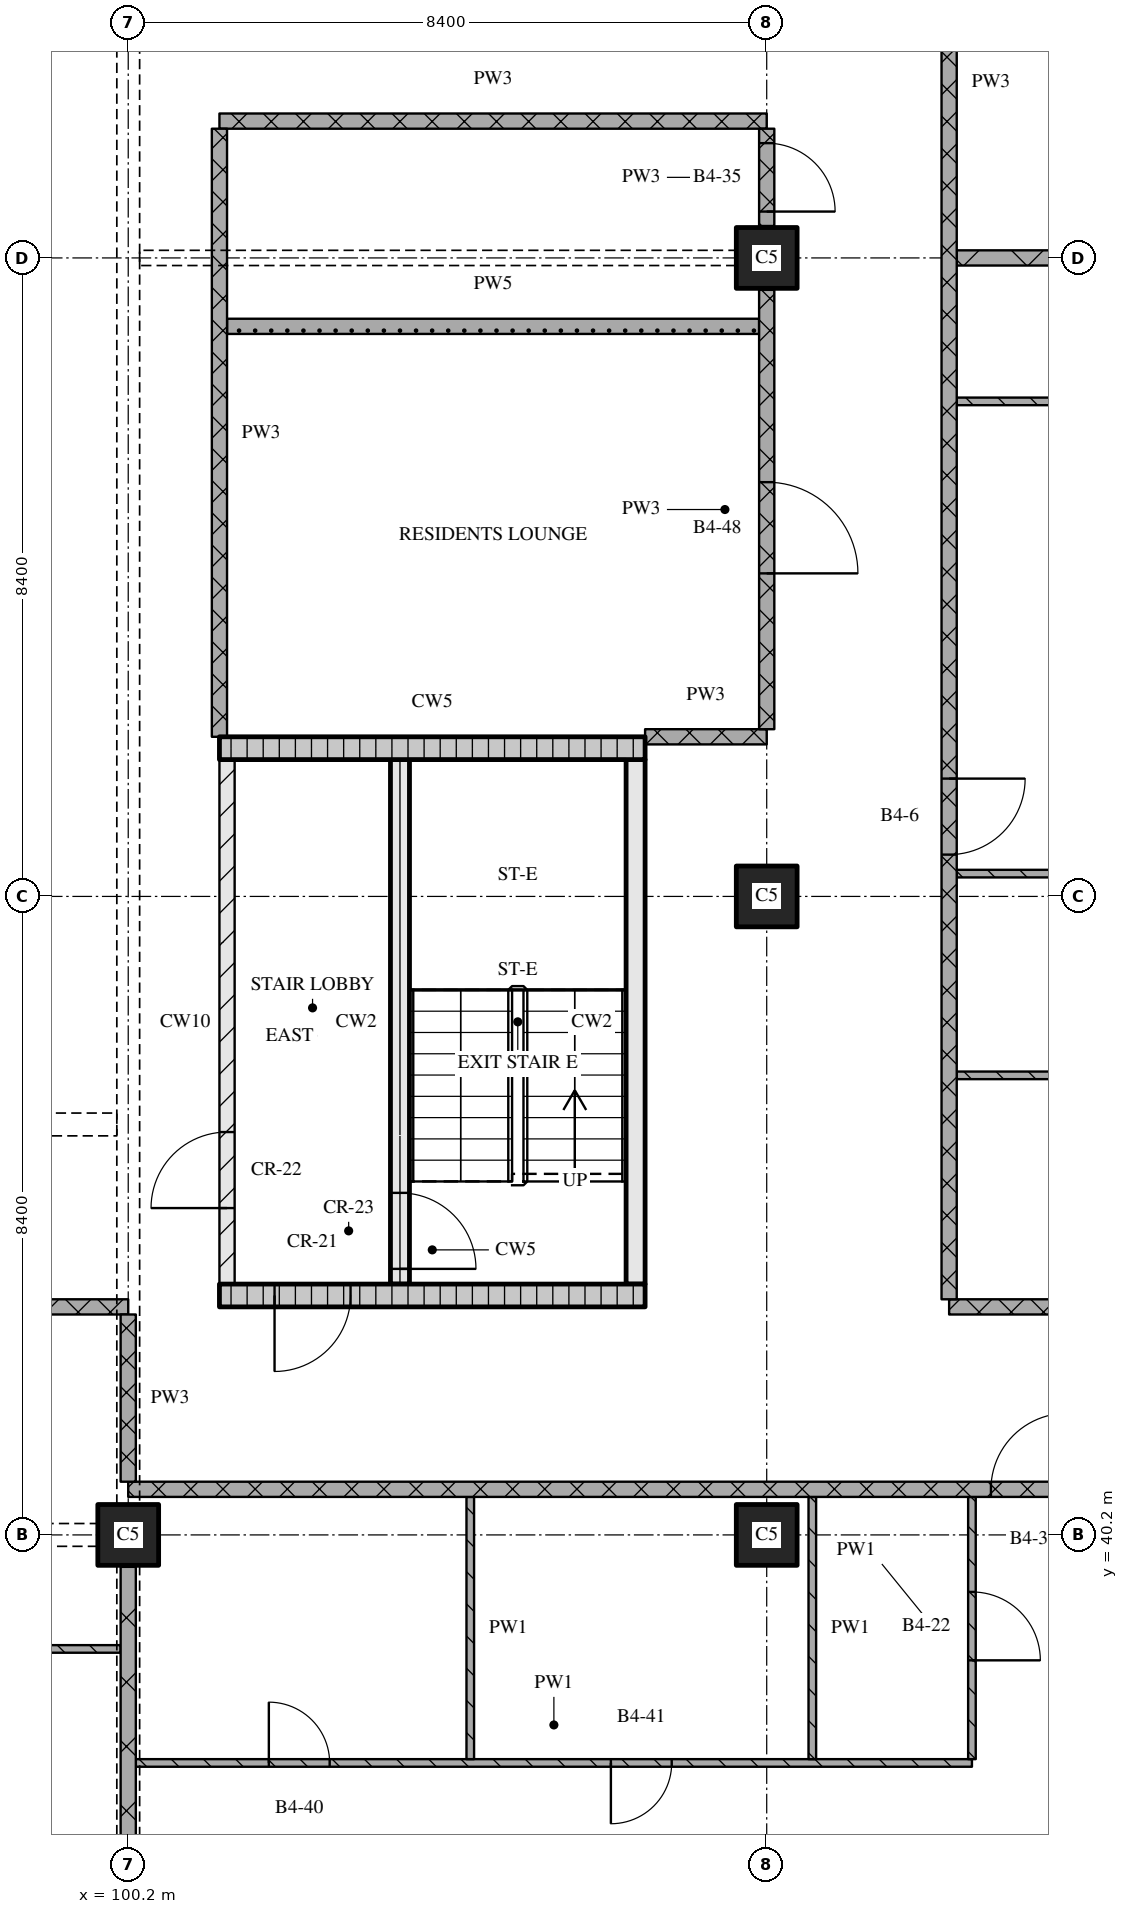
"""IFC4 building model, lengths in metres.
Left out: names, types, materials, properties, quantities, classifications, styles, units other than length and angle.
Written with IfcOpenShell. Run it as: python <this file> out.ifc"""

import sys

from ifc_helpers import new_model, si_unit, direction, frame, frame_2d, origin, origin_2d, place, context, subcontext, project, spatial, rectangle, extrude, element, fill, save


model = new_model("IFC4")
c1 = context("Model", 3, precision=1e-05, world=origin(), true_north=direction((0.0, 1.0)))
c2 = subcontext(c1, "Body", "Model", "MODEL_VIEW")
j1 = project(units=[si_unit("LENGTHUNIT", "METRE"), si_unit("PLANEANGLEUNIT", "RADIAN")], contexts=[c1])
p1 = place(None, origin())
s1 = spatial("IfcSite", under=j1, at=p1, CompositionType="ELEMENT")
p2 = place(p1, origin())
s2 = spatial("IfcBuilding", under=s1, at=p2, CompositionType="ELEMENT")
p3 = place(p2, frame((0.0, 0.0, 134.85)))
s3 = spatial("IfcBuildingStorey", under=s2, at=p3, CompositionType="ELEMENT", Elevation=134.85)
for number, where, z_axis, x_axis in (
    (1, (100.2, 40.2, 0.0), (0.0, 0.0, 1.0), (1.0, 0.0, 0.0)),
    (2, (108.6, 40.2, 0.0), (0.0, 0.0, 1.0), (1.0, 0.0, 0.0)),
    (3, (108.6, 48.6, 0.0), (0.0, 0.0, 1.0), (1.0, 0.0, 0.0)),
    (4, (108.6, 57.0, 0.0), (0.0, 0.0, 1.0), (1.0, 0.0, 0.0)),
):
    element("IfcColumn", number, at=place(p3, frame(where, z_axis=z_axis, x_axis=x_axis)), inside=s3, PredefinedType="COLUMN", context=c2, shape_type="SweptSolid", body=[
        extrude(rectangle(XDim=0.8, YDim=0.8, at=origin_2d()), origin(), (0.0, 0.0, 1.0), 3.6),
    ])
p4 = place(p3, frame((101.4, 43.35, 0.0), z_axis=(0.0, 0.0, 1.0), x_axis=(1.0, 0.0, 0.0)))
e5 = element("IfcWall", 5, at=p4, inside=s3, PredefinedType="SOLIDWALL", context=c2, shape_type="SweptSolid", body=[
    extrude(rectangle(XDim=5.6, YDim=0.3, at=frame_2d((2.8, 0.0))), origin(), (0.0, 0.0, 1.0), 3.32),
])
p5 = place(p4, frame((0.725, 0.0, 0.0)))
e6 = element("IfcOpeningElement", 6, at=p5, cuts=e5, PredefinedType="OPENING", context=c2, shape_type="SweptSolid", body=[
    extrude(rectangle(XDim=1.0, YDim=2.1, at=frame_2d((0.5, 1.05))), frame((0.0, 0.16, 0.0), z_axis=(0.0, -1.0, 0.0), x_axis=(1.0, 0.0, 0.0)), (0.0, 0.0, 1.0), 0.32),
])
p6 = place(p3, frame((101.5, 43.5, 0.0), z_axis=(0.0, 0.0, 1.0), x_axis=(0.0, 1.0, 0.0)))
e7 = element("IfcWall", 7, at=p6, inside=s3, PredefinedType="PARTITIONING", context=c2, shape_type="SweptSolid", body=[
    extrude(rectangle(XDim=6.9, YDim=0.2, at=frame_2d((3.45, 0.0))), origin(), (0.0, 0.0, 1.0), 3.32),
])
p7 = place(p6, frame((1.0, 0.0, 0.0)))
e8 = element("IfcOpeningElement", 8, at=p7, cuts=e7, PredefinedType="OPENING", context=c2, shape_type="SweptSolid", body=[
    extrude(rectangle(XDim=1.0, YDim=2.1, at=frame_2d((0.5, 1.05))), frame((0.0, 0.11, 0.0), z_axis=(0.0, -1.0, 0.0), x_axis=(1.0, 0.0, 0.0)), (0.0, 0.0, 1.0), 0.22),
])
p8 = place(p3, frame((103.775, 43.5, 0.0), z_axis=(0.0, 0.0, 1.0), x_axis=(0.0, 1.0, 0.0)))
e9 = element("IfcWall", 9, at=p8, inside=s3, PredefinedType="SOLIDWALL", context=c2, shape_type="SweptSolid", body=[
    extrude(rectangle(XDim=6.9, YDim=0.25, at=frame_2d((3.45, 0.0))), origin(), (0.0, 0.0, 1.0), 3.32),
])
p9 = place(p8, frame((0.2, 0.0, 0.0)))
e10 = element("IfcOpeningElement", 10, at=p9, cuts=e9, PredefinedType="OPENING", context=c2, shape_type="SweptSolid", body=[
    extrude(rectangle(XDim=1.0, YDim=2.1, at=frame_2d((0.5, 1.05))), frame((0.0, 0.135, 0.0), z_axis=(0.0, -1.0, 0.0), x_axis=(1.0, 0.0, 0.0)), (0.0, 0.0, 1.0), 0.27),
])
p10 = place(p3, frame((106.875, 43.5, 0.0), z_axis=(0.0, 0.0, 1.0), x_axis=(0.0, 1.0, 0.0)))
e11 = element("IfcWall", 11, at=p10, inside=s3, PredefinedType="SOLIDWALL", context=c2, shape_type="SweptSolid", body=[
    extrude(rectangle(XDim=6.9, YDim=0.25, at=frame_2d((3.45, 0.0))), origin(), (0.0, 0.0, 1.0), 3.32),
])
p11 = place(p3, frame((101.4, 50.55, 0.0), z_axis=(0.0, 0.0, 1.0), x_axis=(1.0, 0.0, 0.0)))
e12 = element("IfcWall", 12, at=p11, inside=s3, PredefinedType="SOLIDWALL", context=c2, shape_type="SweptSolid", body=[
    extrude(rectangle(XDim=5.6, YDim=0.3, at=frame_2d((2.8, 0.0))), origin(), (0.0, 0.0, 1.0), 3.32),
])
p12 = place(p3, frame((100.3, 37.2, 0.0), z_axis=(0.0, 0.0, 1.0), x_axis=(1.0, 0.0, 0.0)))
e13 = element("IfcWall", 13, at=p12, inside=s3, PredefinedType="PARTITIONING", context=c2, shape_type="SweptSolid", body=[
    extrude(rectangle(XDim=11.0, YDim=0.1, at=frame_2d((5.5, 0.0))), origin(), (0.0, 0.0, 1.0), 3.32),
])
p13 = place(p12, frame((1.75, 0.0, 0.0)))
e14 = element("IfcOpeningElement", 14, at=p13, cuts=e13, PredefinedType="OPENING", context=c2, shape_type="SweptSolid", body=[
    extrude(rectangle(XDim=0.8, YDim=2.1, at=frame_2d((0.4, 1.05))), frame((0.0, 0.06, 0.0), z_axis=(0.0, -1.0, 0.0), x_axis=(1.0, 0.0, 0.0)), (0.0, 0.0, 1.0), 0.12),
])
p14 = place(p12, frame((6.25, 0.0, 0.0)))
e15 = element("IfcOpeningElement", 15, at=p14, cuts=e13, PredefinedType="OPENING", context=c2, shape_type="SweptSolid", body=[
    extrude(rectangle(XDim=0.8, YDim=2.1, at=frame_2d((0.4, 1.05))), frame((0.0, 0.06, 0.0), z_axis=(0.0, -1.0, 0.0), x_axis=(1.0, 0.0, 0.0)), (0.0, 0.0, 1.0), 0.12),
])
p15 = place(p3, frame((91.2, 38.7, 0.0), z_axis=(0.0, 0.0, 1.0), x_axis=(1.0, 0.0, 0.0)))
e16 = element("IfcWall", 16, at=p15, inside=s3, PredefinedType="PARTITIONING", context=c2, shape_type="SweptSolid", body=[
    extrude(rectangle(XDim=8.9, YDim=0.1, at=frame_2d((4.45, 0.0))), origin(), (0.0, 0.0, 1.0), 3.32),
])
p16 = place(p15, frame((4.05, 0.0, 0.0)))
e17 = element("IfcOpeningElement", 17, at=p16, cuts=e16, PredefinedType="OPENING", context=c2, shape_type="SweptSolid", body=[
    extrude(rectangle(XDim=0.9, YDim=2.1, at=frame_2d((0.45, 1.05))), frame((0.0, 0.06, 0.0), z_axis=(0.0, -1.0, 0.0), x_axis=(1.0, 0.0, 0.0)), (0.0, 0.0, 1.0), 0.12),
])
p17 = place(p3, frame((124.38, 40.8, 0.0), z_axis=(0.0, 0.0, 1.0), x_axis=(-1.0, 0.0, 0.0)))
e18 = element("IfcWall", 18, at=p17, inside=s3, PredefinedType="PARTITIONING", context=c2, shape_type="SweptSolid", body=[
    extrude(rectangle(XDim=24.18, YDim=0.2, at=frame_2d((12.09, 0.0))), origin(), (0.0, 0.0, 1.0), 3.32),
])
p18 = place(p17, frame((11.83, 0.0, 0.0)))
e19 = element("IfcOpeningElement", 19, at=p18, cuts=e18, PredefinedType="OPENING", context=c2, shape_type="SweptSolid", body=[
    extrude(rectangle(XDim=1.0, YDim=2.1, at=frame_2d((0.5, 1.05))), frame((0.0, 0.11, 0.0), z_axis=(0.0, -1.0, 0.0), x_axis=(1.0, 0.0, 0.0)), (0.0, 0.0, 1.0), 0.22),
])
p19 = place(p3, frame((100.2, 43.2, 0.0), z_axis=(0.0, 0.0, 1.0), x_axis=(-1.0, 0.0, 0.0)))
e20 = element("IfcWall", 20, at=p19, inside=s3, PredefinedType="PARTITIONING", context=c2, shape_type="SweptSolid", body=[
    extrude(rectangle(XDim=25.2, YDim=0.2, at=frame_2d((12.6, 0.0))), origin(), (0.0, 0.0, 1.0), 3.32),
])
p20 = place(p19, frame((16.75, 0.0, 0.0)))
e21 = element("IfcOpeningElement", 21, at=p20, cuts=e20, PredefinedType="OPENING", context=c2, shape_type="SweptSolid", body=[
    extrude(rectangle(XDim=1.0, YDim=2.1, at=frame_2d((0.5, 1.05))), frame((0.0, 0.11, 0.0), z_axis=(0.0, -1.0, 0.0), x_axis=(1.0, 0.0, 0.0)), (0.0, 0.0, 1.0), 0.22),
])
p21 = place(p3, frame((111.0, 43.2, 0.0), z_axis=(0.0, 0.0, 1.0), x_axis=(1.0, 0.0, 0.0)))
e22 = element("IfcWall", 22, at=p21, inside=s3, PredefinedType="PARTITIONING", context=c2, shape_type="SweptSolid", body=[
    extrude(rectangle(XDim=15.92, YDim=0.2, at=frame_2d((7.96, 0.0))), origin(), (0.0, 0.0, 1.0), 3.32),
])
p22 = place(p3, frame((111.1, 46.246, 0.0), z_axis=(0.0, 0.0, 1.0), x_axis=(1.0, 0.0, 0.0)))
e23 = element("IfcWall", 23, at=p22, inside=s3, PredefinedType="PARTITIONING", context=c2, shape_type="SweptSolid", body=[
    extrude(rectangle(XDim=8.55, YDim=0.1, at=frame_2d((4.275, 0.0))), origin(), (0.0, 0.0, 1.0), 3.32),
])
p23 = place(p3, frame((111.1, 48.9, 0.0), z_axis=(0.0, 0.0, 1.0), x_axis=(1.0, 0.0, 0.0)))
e24 = element("IfcWall", 24, at=p23, inside=s3, PredefinedType="PARTITIONING", context=c2, shape_type="SweptSolid", body=[
    extrude(rectangle(XDim=5.48, YDim=0.1, at=frame_2d((2.74, 0.0))), origin(), (0.0, 0.0, 1.0), 3.32),
])
p24 = place(p3, frame((107.0, 50.7, 0.0), z_axis=(0.0, 0.0, 1.0), x_axis=(1.0, 0.0, 0.0)))
e25 = element("IfcWall", 25, at=p24, inside=s3, PredefinedType="PARTITIONING", context=c2, shape_type="SweptSolid", body=[
    extrude(rectangle(XDim=1.6, YDim=0.2, at=frame_2d((0.8, 0.0))), origin(), (0.0, 0.0, 1.0), 3.32),
])
p25 = place(p3, frame((111.1, 55.113, 0.0), z_axis=(0.0, 0.0, 1.0), x_axis=(1.0, 0.0, 0.0)))
e26 = element("IfcWall", 26, at=p25, inside=s3, PredefinedType="PARTITIONING", context=c2, shape_type="SweptSolid", body=[
    extrude(rectangle(XDim=8.6, YDim=0.1, at=frame_2d((4.3, 0.0))), origin(), (0.0, 0.0, 1.0), 3.32),
])
p26 = place(p3, frame((101.5, 56.1, 0.0), z_axis=(0.0, 0.0, 1.0), x_axis=(1.0, 0.0, 0.0)))
e27 = element("IfcWall", 27, at=p26, inside=s3, PredefinedType="PARTITIONING", context=c2, shape_type="SweptSolid", body=[
    extrude(rectangle(XDim=7.0, YDim=0.2, at=frame_2d((3.5, 0.0))), origin(), (0.0, 0.0, 1.0), 3.32),
])
p27 = place(p3, frame((111.1, 57.0, 0.0), z_axis=(0.0, 0.0, 1.0), x_axis=(1.0, 0.0, 0.0)))
e28 = element("IfcWall", 28, at=p27, inside=s3, PredefinedType="PARTITIONING", context=c2, shape_type="SweptSolid", body=[
    extrude(rectangle(XDim=5.48, YDim=0.2, at=frame_2d((2.74, 0.0))), origin(), (0.0, 0.0, 1.0), 3.32),
])
p28 = place(p3, frame((101.4, 58.8, 0.0), z_axis=(0.0, 0.0, 1.0), x_axis=(1.0, 0.0, 0.0)))
e29 = element("IfcWall", 29, at=p28, inside=s3, PredefinedType="PARTITIONING", context=c2, shape_type="SweptSolid", body=[
    extrude(rectangle(XDim=7.2, YDim=0.2, at=frame_2d((3.6, 0.0))), origin(), (0.0, 0.0, 1.0), 3.32),
])
p29 = place(p3, frame((100.2, 43.1, 0.0), z_axis=(0.0, 0.0, 1.0), x_axis=(0.0, -1.0, 0.0)))
e30 = element("IfcWall", 30, at=p29, inside=s3, PredefinedType="PARTITIONING", context=c2, shape_type="SweptSolid", body=[
    extrude(rectangle(XDim=2.2, YDim=0.2, at=frame_2d((1.1, 0.0))), origin(), (0.0, 0.0, 1.0), 2.43),
])
p30 = place(p3, frame((100.2, 39.78, 0.0), z_axis=(0.0, 0.0, 1.0), x_axis=(0.0, -1.0, 0.0)))
e31 = element("IfcWall", 31, at=p30, inside=s3, PredefinedType="PARTITIONING", context=c2, shape_type="SweptSolid", body=[
    extrude(rectangle(XDim=7.56, YDim=0.2, at=frame_2d((3.78, 0.0))), origin(), (0.0, 0.0, 1.0), 2.83),
])
p31 = place(p3, frame((101.4, 58.7, 0.0), z_axis=(0.0, 0.0, 1.0), x_axis=(0.0, -1.0, 0.0)))
e32 = element("IfcWall", 32, at=p31, inside=s3, PredefinedType="PARTITIONING", context=c2, shape_type="SweptSolid", body=[
    extrude(rectangle(XDim=8.0, YDim=0.2, at=frame_2d((4.0, 0.0))), origin(), (0.0, 0.0, 1.0), 3.32),
])
p32 = place(p3, frame((104.7, 40.7, 0.0), z_axis=(0.0, 0.0, 1.0), x_axis=(0.0, -1.0, 0.0)))
e33 = element("IfcWall", 33, at=p32, inside=s3, PredefinedType="PARTITIONING", context=c2, shape_type="SweptSolid", body=[
    extrude(rectangle(XDim=3.45, YDim=0.1, at=frame_2d((1.725, 0.0))), origin(), (0.0, 0.0, 1.0), 3.32),
])
p33 = place(p3, frame((108.6, 50.8, 0.0), z_axis=(0.0, 0.0, 1.0), x_axis=(0.0, 1.0, 0.0)))
e34 = element("IfcWall", 34, at=p33, inside=s3, PredefinedType="PARTITIONING", context=c2, shape_type="SweptSolid", body=[
    extrude(rectangle(XDim=5.78, YDim=0.2, at=frame_2d((2.89, 0.0))), origin(), (0.0, 0.0, 1.0), 3.32),
])
p34 = place(p33, frame((2.05, 0.0, 0.0)))
e35 = element("IfcOpeningElement", 35, at=p34, cuts=e34, PredefinedType="OPENING", context=c2, shape_type="SweptSolid", body=[
    extrude(rectangle(XDim=1.2, YDim=2.1, at=frame_2d((0.6, 1.05))), frame((0.0, 0.11, 0.0), z_axis=(0.0, -1.0, 0.0), x_axis=(1.0, 0.0, 0.0)), (0.0, 0.0, 1.0), 0.22),
])
p35 = place(p3, frame((108.6, 57.42, 0.0), z_axis=(0.0, 0.0, 1.0), x_axis=(0.0, 1.0, 0.0)))
e36 = element("IfcWall", 36, at=p35, inside=s3, PredefinedType="PARTITIONING", context=c2, shape_type="SweptSolid", body=[
    extrude(rectangle(XDim=1.28, YDim=0.2, at=frame_2d((0.64, 0.0))), origin(), (0.0, 0.0, 1.0), 3.32),
])
p36 = place(p35, frame((0.19, 0.0, 0.0)))
e37 = element("IfcOpeningElement", 37, at=p36, cuts=e36, PredefinedType="OPENING", context=c2, shape_type="SweptSolid", body=[
    extrude(rectangle(XDim=0.9, YDim=2.1, at=frame_2d((0.45, 1.05))), frame((0.0, 0.11, 0.0), z_axis=(0.0, -1.0, 0.0), x_axis=(1.0, 0.0, 0.0)), (0.0, 0.0, 1.0), 0.22),
])
p37 = place(p3, frame((109.2, 40.7, 0.0), z_axis=(0.0, 0.0, 1.0), x_axis=(0.0, -1.0, 0.0)))
e38 = element("IfcWall", 38, at=p37, inside=s3, PredefinedType="PARTITIONING", context=c2, shape_type="SweptSolid", body=[
    extrude(rectangle(XDim=3.45, YDim=0.1, at=frame_2d((1.725, 0.0))), origin(), (0.0, 0.0, 1.0), 3.32),
])
p38 = place(p3, frame((111.0, 75.32, 0.0), z_axis=(0.0, 0.0, 1.0), x_axis=(0.0, -1.0, 0.0)))
e39 = element("IfcWall", 39, at=p38, inside=s3, PredefinedType="PARTITIONING", context=c2, shape_type="SweptSolid", body=[
    extrude(rectangle(XDim=32.02, YDim=0.2, at=frame_2d((16.01, 0.0))), origin(), (0.0, 0.0, 1.0), 3.32),
])
p39 = place(p38, frame((8.67, 0.0, 0.0)))
e40 = element("IfcOpeningElement", 40, at=p39, cuts=e39, PredefinedType="OPENING", context=c2, shape_type="SweptSolid", body=[
    extrude(rectangle(XDim=1.0, YDim=2.1, at=frame_2d((0.5, 1.05))), frame((0.0, 0.11, 0.0), z_axis=(0.0, -1.0, 0.0), x_axis=(1.0, 0.0, 0.0)), (0.0, 0.0, 1.0), 0.22),
])
p40 = place(p38, frame((25.17, 0.0, 0.0)))
e41 = element("IfcOpeningElement", 41, at=p40, cuts=e39, PredefinedType="OPENING", context=c2, shape_type="SweptSolid", body=[
    extrude(rectangle(XDim=1.0, YDim=2.1, at=frame_2d((0.5, 1.05))), frame((0.0, 0.11, 0.0), z_axis=(0.0, -1.0, 0.0), x_axis=(1.0, 0.0, 0.0)), (0.0, 0.0, 1.0), 0.22),
])
p41 = place(p3, frame((111.3, 37.25, 0.0), z_axis=(0.0, 0.0, 1.0), x_axis=(0.0, 1.0, 0.0)))
e42 = element("IfcWall", 42, at=p41, inside=s3, PredefinedType="PARTITIONING", context=c2, shape_type="SweptSolid", body=[
    extrude(rectangle(XDim=3.45, YDim=0.1, at=frame_2d((1.725, 0.0))), origin(), (0.0, 0.0, 1.0), 3.32),
])
p42 = place(p41, frame((1.3, 0.0, 0.0)))
e43 = element("IfcOpeningElement", 43, at=p42, cuts=e42, PredefinedType="OPENING", context=c2, shape_type="SweptSolid", body=[
    extrude(rectangle(XDim=0.9, YDim=2.1, at=frame_2d((0.45, 1.05))), frame((0.0, 0.06, 0.0), z_axis=(0.0, -1.0, 0.0), x_axis=(1.0, 0.0, 0.0)), (0.0, 0.0, 1.0), 0.12),
])
p43 = place(p5, origin())
e44 = element("IfcDoor", 44, at=p43, inside=s3, OperationType="SINGLE_SWING_RIGHT", PredefinedType="DOOR", context=c2, shape_type="SweptSolid", body=[
    extrude(rectangle(XDim=1.0, YDim=2.1, at=frame_2d((0.5, 1.05))), frame((0.0, 0.025, 0.0), z_axis=(0.0, -1.0, 0.0), x_axis=(1.0, 0.0, 0.0)), (0.0, 0.0, 1.0), 0.05),
])
fill(e6, e44)
p44 = place(p9, origin())
e45 = element("IfcDoor", 45, at=p44, inside=s3, OperationType="SINGLE_SWING_RIGHT", PredefinedType="DOOR", context=c2, shape_type="SweptSolid", body=[
    extrude(rectangle(XDim=1.0, YDim=2.1, at=frame_2d((0.5, 1.05))), frame((0.0, 0.025, 0.0), z_axis=(0.0, -1.0, 0.0), x_axis=(1.0, 0.0, 0.0)), (0.0, 0.0, 1.0), 0.05),
])
fill(e10, e45)
p45 = place(p7, origin())
e46 = element("IfcDoor", 46, at=p45, inside=s3, OperationType="SINGLE_SWING_LEFT", PredefinedType="DOOR", context=c2, shape_type="SweptSolid", body=[
    extrude(rectangle(XDim=1.0, YDim=2.1, at=frame_2d((0.5, 1.05))), frame((0.0, 0.025, 0.0), z_axis=(0.0, -1.0, 0.0), x_axis=(1.0, 0.0, 0.0)), (0.0, 0.0, 1.0), 0.05),
])
fill(e8, e46)
p46 = place(p13, origin())
e47 = element("IfcDoor", 47, at=p46, inside=s3, OperationType="SINGLE_SWING_LEFT", PredefinedType="DOOR", context=c2, shape_type="SweptSolid", body=[
    extrude(rectangle(XDim=0.8, YDim=2.1, at=frame_2d((0.4, 1.05))), frame((0.0, 0.025, 0.0), z_axis=(0.0, -1.0, 0.0), x_axis=(1.0, 0.0, 0.0)), (0.0, 0.0, 1.0), 0.05),
])
fill(e14, e47)
p47 = place(p14, origin())
e48 = element("IfcDoor", 48, at=p47, inside=s3, OperationType="SINGLE_SWING_RIGHT", PredefinedType="DOOR", context=c2, shape_type="SweptSolid", body=[
    extrude(rectangle(XDim=0.8, YDim=2.1, at=frame_2d((0.4, 1.05))), frame((0.0, 0.025, 0.0), z_axis=(0.0, -1.0, 0.0), x_axis=(1.0, 0.0, 0.0)), (0.0, 0.0, 1.0), 0.05),
])
fill(e15, e48)
p48 = place(p18, origin())
e49 = element("IfcDoor", 49, at=p48, inside=s3, OperationType="SINGLE_SWING_RIGHT", PredefinedType="DOOR", context=c2, shape_type="SweptSolid", body=[
    extrude(rectangle(XDim=1.0, YDim=2.1, at=frame_2d((0.5, 1.05))), frame((0.0, 0.025, 0.0), z_axis=(0.0, -1.0, 0.0), x_axis=(1.0, 0.0, 0.0)), (0.0, 0.0, 1.0), 0.05),
])
fill(e19, e49)
p49 = place(p34, origin())
e50 = element("IfcDoor", 50, at=p49, inside=s3, OperationType="SINGLE_SWING_RIGHT", PredefinedType="DOOR", context=c2, shape_type="SweptSolid", body=[
    extrude(rectangle(XDim=1.2, YDim=2.1, at=frame_2d((0.6, 1.05))), frame((0.0, 0.025, 0.0), z_axis=(0.0, -1.0, 0.0), x_axis=(1.0, 0.0, 0.0)), (0.0, 0.0, 1.0), 0.05),
])
fill(e35, e50)
p50 = place(p36, origin())
e51 = element("IfcDoor", 51, at=p50, inside=s3, OperationType="SINGLE_SWING_RIGHT", PredefinedType="DOOR", context=c2, shape_type="SweptSolid", body=[
    extrude(rectangle(XDim=0.9, YDim=2.1, at=frame_2d((0.45, 1.05))), frame((0.0, 0.025, 0.0), z_axis=(0.0, -1.0, 0.0), x_axis=(1.0, 0.0, 0.0)), (0.0, 0.0, 1.0), 0.05),
])
fill(e37, e51)
p51 = place(p40, origin())
e52 = element("IfcDoor", 52, at=p51, inside=s3, OperationType="SINGLE_SWING_LEFT", PredefinedType="DOOR", context=c2, shape_type="SweptSolid", body=[
    extrude(rectangle(XDim=1.0, YDim=2.1, at=frame_2d((0.5, 1.05))), frame((0.0, 0.025, 0.0), z_axis=(0.0, -1.0, 0.0), x_axis=(1.0, 0.0, 0.0)), (0.0, 0.0, 1.0), 0.05),
])
fill(e41, e52)
p52 = place(p42, origin())
e53 = element("IfcDoor", 53, at=p52, inside=s3, OperationType="SINGLE_SWING_RIGHT", PredefinedType="DOOR", context=c2, shape_type="SweptSolid", body=[
    extrude(rectangle(XDim=0.9, YDim=2.1, at=frame_2d((0.45, 1.05))), frame((0.0, 0.025, 0.0), z_axis=(0.0, -1.0, 0.0), x_axis=(1.0, 0.0, 0.0)), (0.0, 0.0, 1.0), 0.05),
])
fill(e43, e53)
save(model, sys.argv[1])
